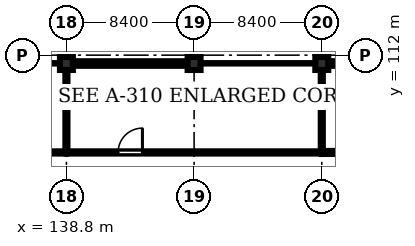
"""IFC4 building model, lengths in metres.
Left out: names, types, materials, properties, quantities, classifications, styles, units other than length and angle.
Written with IfcOpenShell. Run it as: python <this file> out.ifc"""

import sys

from ifc_helpers import new_model, si_unit, direction, frame, frame_2d, origin, origin_2d, place, context, subcontext, project, spatial, rectangle, extrude, element, fill, save


model = new_model("IFC4")
c1 = context("Model", 3, precision=1e-05, world=origin(), true_north=direction((0.0, 1.0)))
c2 = subcontext(c1, "Body", "Model", "MODEL_VIEW")
j1 = project(units=[si_unit("LENGTHUNIT", "METRE"), si_unit("PLANEANGLEUNIT", "RADIAN")], contexts=[c1])
p1 = place(None, origin())
s1 = spatial("IfcSite", under=j1, at=p1, CompositionType="ELEMENT")
p2 = place(p1, origin())
s2 = spatial("IfcBuilding", under=s1, at=p2, CompositionType="ELEMENT")
p3 = place(p2, frame((0.0, 0.0, 31.8)))
s3 = spatial("IfcBuildingStorey", under=s2, at=p3, CompositionType="ELEMENT", Elevation=31.8)
for number, where, z_axis, x_axis in (
    (1, (138.8, 111.45, 0.0), (0.0, 0.0, 1.0), (1.0, 0.0, 0.0)),
    (2, (147.2, 111.45, 0.0), (0.0, 0.0, 1.0), (1.0, 0.0, 0.0)),
    (3, (155.6, 111.45, 0.0), (0.0, 0.0, 1.0), (1.0, 0.0, 0.0)),
):
    element("IfcColumn", number, at=place(p3, frame(where, z_axis=z_axis, x_axis=x_axis)), inside=s3, PredefinedType="COLUMN", context=c2, shape_type="SweptSolid", body=[
        extrude(rectangle(XDim=0.85, YDim=0.85, at=origin_2d()), origin(), (0.0, 0.0, 1.0), 4.02),
    ])
p4 = place(p3, frame((139.225, 111.45, 0.0), z_axis=(0.0, 0.0, 1.0), x_axis=(1.0, 0.0, 0.0)))
e4 = element("IfcWall", 4, at=p4, inside=s3, PredefinedType="STANDARD", context=c2, shape_type="SweptSolid", body=[
    extrude(rectangle(XDim=7.55, YDim=0.3, at=frame_2d((3.775, 0.0))), origin(), (0.0, 0.0, 1.0), 3.32),
])
p5 = place(p4, frame((0.85, 0.0, 0.9)))
e5 = element("IfcOpeningElement", 5, at=p5, cuts=e4, PredefinedType="OPENING", context=c2, shape_type="SweptSolid", body=[
    extrude(rectangle(XDim=1.8, YDim=2.1, at=frame_2d((0.9, 1.05))), frame((0.0, 0.16, 0.0), z_axis=(0.0, -1.0, 0.0), x_axis=(1.0, 0.0, 0.0)), (0.0, 0.0, 1.0), 0.32),
])
p6 = place(p4, frame((4.65, 0.0, 0.9)))
e6 = element("IfcOpeningElement", 6, at=p6, cuts=e4, PredefinedType="OPENING", context=c2, shape_type="SweptSolid", body=[
    extrude(rectangle(XDim=1.8, YDim=2.1, at=frame_2d((0.9, 1.05))), frame((0.0, 0.16, 0.0), z_axis=(0.0, -1.0, 0.0), x_axis=(1.0, 0.0, 0.0)), (0.0, 0.0, 1.0), 0.32),
])
p7 = place(p3, frame((156.025, 111.45, 0.0), z_axis=(0.0, 0.0, 1.0), x_axis=(1.0, 0.0, 0.0)))
e7 = element("IfcWall", 7, at=p7, inside=s3, PredefinedType="STANDARD", context=c2, shape_type="SweptSolid", body=[
    extrude(rectangle(XDim=7.0, YDim=0.3, at=frame_2d((3.5, 0.0))), origin(), (0.0, 0.0, 1.0), 3.32),
])
p8 = place(p7, frame((0.85, 0.0, 0.9)))
e8 = element("IfcOpeningElement", 8, at=p8, cuts=e7, PredefinedType="OPENING", context=c2, shape_type="SweptSolid", body=[
    extrude(rectangle(XDim=1.8, YDim=2.1, at=frame_2d((0.9, 1.05))), frame((0.0, 0.16, 0.0), z_axis=(0.0, -1.0, 0.0), x_axis=(1.0, 0.0, 0.0)), (0.0, 0.0, 1.0), 0.32),
])
p9 = place(p7, frame((4.65, 0.0, 0.9)))
e9 = element("IfcOpeningElement", 9, at=p9, cuts=e7, PredefinedType="OPENING", context=c2, shape_type="SweptSolid", body=[
    extrude(rectangle(XDim=1.8, YDim=2.1, at=frame_2d((0.9, 1.05))), frame((0.0, 0.16, 0.0), z_axis=(0.0, -1.0, 0.0), x_axis=(1.0, 0.0, 0.0)), (0.0, 0.0, 1.0), 0.32),
])
p10 = place(p3, frame((122.15, 105.6, 0.0), z_axis=(0.0, 0.0, 1.0), x_axis=(1.0, 0.0, 0.0)))
e10 = element("IfcWall", 10, at=p10, inside=s3, PredefinedType="PARTITIONING", context=c2, shape_type="SweptSolid", body=[
    extrude(rectangle(XDim=16.65, YDim=0.145, at=frame_2d((8.325, 0.0))), origin(), (0.0, 0.0, 1.0), 4.02),
])
p11 = place(p10, frame((3.75, 0.0, 0.0)))
e11 = element("IfcOpeningElement", 11, at=p11, cuts=e10, PredefinedType="OPENING", context=c2, shape_type="SweptSolid", body=[
    extrude(rectangle(XDim=1.6, YDim=2.24, at=frame_2d((0.8, 1.12))), frame((0.0, 0.083, 0.0), z_axis=(0.0, -1.0, 0.0), x_axis=(1.0, 0.0, 0.0)), (0.0, 0.0, 1.0), 0.165),
])
p12 = place(p3, frame((138.8, 105.6, 0.0), z_axis=(0.0, 0.0, 1.0), x_axis=(1.0, 0.0, 0.0)))
e12 = element("IfcWall", 12, at=p12, inside=s3, PredefinedType="PARTITIONING", context=c2, shape_type="SweptSolid", body=[
    extrude(rectangle(XDim=16.8, YDim=0.145, at=frame_2d((8.4, 0.0))), origin(), (0.0, 0.0, 1.0), 4.02),
])
p13 = place(p12, frame((3.4, 0.0, 0.0)))
e13 = element("IfcOpeningElement", 13, at=p13, cuts=e12, PredefinedType="OPENING", context=c2, shape_type="SweptSolid", body=[
    extrude(rectangle(XDim=1.6, YDim=2.24, at=frame_2d((0.8, 1.12))), frame((0.0, 0.083, 0.0), z_axis=(0.0, -1.0, 0.0), x_axis=(1.0, 0.0, 0.0)), (0.0, 0.0, 1.0), 0.165),
])
p14 = place(p3, frame((138.8, 105.6, 0.0), z_axis=(0.0, 0.0, 1.0), x_axis=(0.0, 1.0, 0.0)))
e14 = element("IfcWall", 14, at=p14, inside=s3, PredefinedType="PARTITIONING", context=c2, shape_type="SweptSolid", body=[
    extrude(rectangle(XDim=5.75, YDim=0.135, at=frame_2d((2.875, 0.0))), origin(), (0.0, 0.0, 1.0), 3.32),
])
p15 = place(p3, frame((155.6, 105.6, 0.0), z_axis=(0.0, 0.0, 1.0), x_axis=(1.0, 0.0, 0.0)))
e15 = element("IfcWall", 15, at=p15, inside=s3, PredefinedType="SOLIDWALL", context=c2, shape_type="SweptSolid", body=[
    extrude(rectangle(XDim=7.75, YDim=0.2, at=frame_2d((3.875, 0.0))), origin(), (0.0, 0.0, 1.0), 4.02),
])
p16 = place(p15, frame((3.4, 0.0, 0.0)))
e16 = element("IfcOpeningElement", 16, at=p16, cuts=e15, PredefinedType="OPENING", context=c2, shape_type="SweptSolid", body=[
    extrude(rectangle(XDim=1.05, YDim=2.15, at=frame_2d((0.525, 1.075))), frame((0.0, 0.11, 0.0), z_axis=(0.0, -1.0, 0.0), x_axis=(1.0, 0.0, 0.0)), (0.0, 0.0, 1.0), 0.22),
])
p17 = place(p3, frame((155.6, 105.6, 0.0), z_axis=(0.0, 0.0, 1.0), x_axis=(0.0, 1.0, 0.0)))
e17 = element("IfcWall", 17, at=p17, inside=s3, PredefinedType="PARTITIONING", context=c2, shape_type="SweptSolid", body=[
    extrude(rectangle(XDim=5.75, YDim=0.135, at=frame_2d((2.875, 0.0))), origin(), (0.0, 0.0, 1.0), 3.32),
])
p18 = place(p5, origin())
e18 = element("IfcWindow", 18, at=p18, inside=s3, PartitioningType="DOUBLE_PANEL_VERTICAL", PredefinedType="WINDOW", context=c2, shape_type="SweptSolid", body=[
    extrude(rectangle(XDim=1.8, YDim=2.1, at=frame_2d((0.9, 1.05))), frame((0.0, 0.03, 0.0), z_axis=(0.0, -1.0, 0.0), x_axis=(1.0, 0.0, 0.0)), (0.0, 0.0, 1.0), 0.06),
])
fill(e5, e18)
p19 = place(p6, origin())
e19 = element("IfcWindow", 19, at=p19, inside=s3, PartitioningType="DOUBLE_PANEL_VERTICAL", PredefinedType="WINDOW", context=c2, shape_type="SweptSolid", body=[
    extrude(rectangle(XDim=1.8, YDim=2.1, at=frame_2d((0.9, 1.05))), frame((0.0, 0.03, 0.0), z_axis=(0.0, -1.0, 0.0), x_axis=(1.0, 0.0, 0.0)), (0.0, 0.0, 1.0), 0.06),
])
fill(e6, e19)
p20 = place(p13, origin())
e20 = element("IfcDoor", 20, at=p20, inside=s3, OperationType="SINGLE_SWING_RIGHT", PredefinedType="DOOR", context=c2, shape_type="SweptSolid", body=[
    extrude(rectangle(XDim=1.6, YDim=2.24, at=frame_2d((0.8, 1.12))), frame((0.0, 0.025, 0.0), z_axis=(0.0, -1.0, 0.0), x_axis=(1.0, 0.0, 0.0)), (0.0, 0.0, 1.0), 0.05),
])
fill(e13, e20)
save(model, sys.argv[1])
